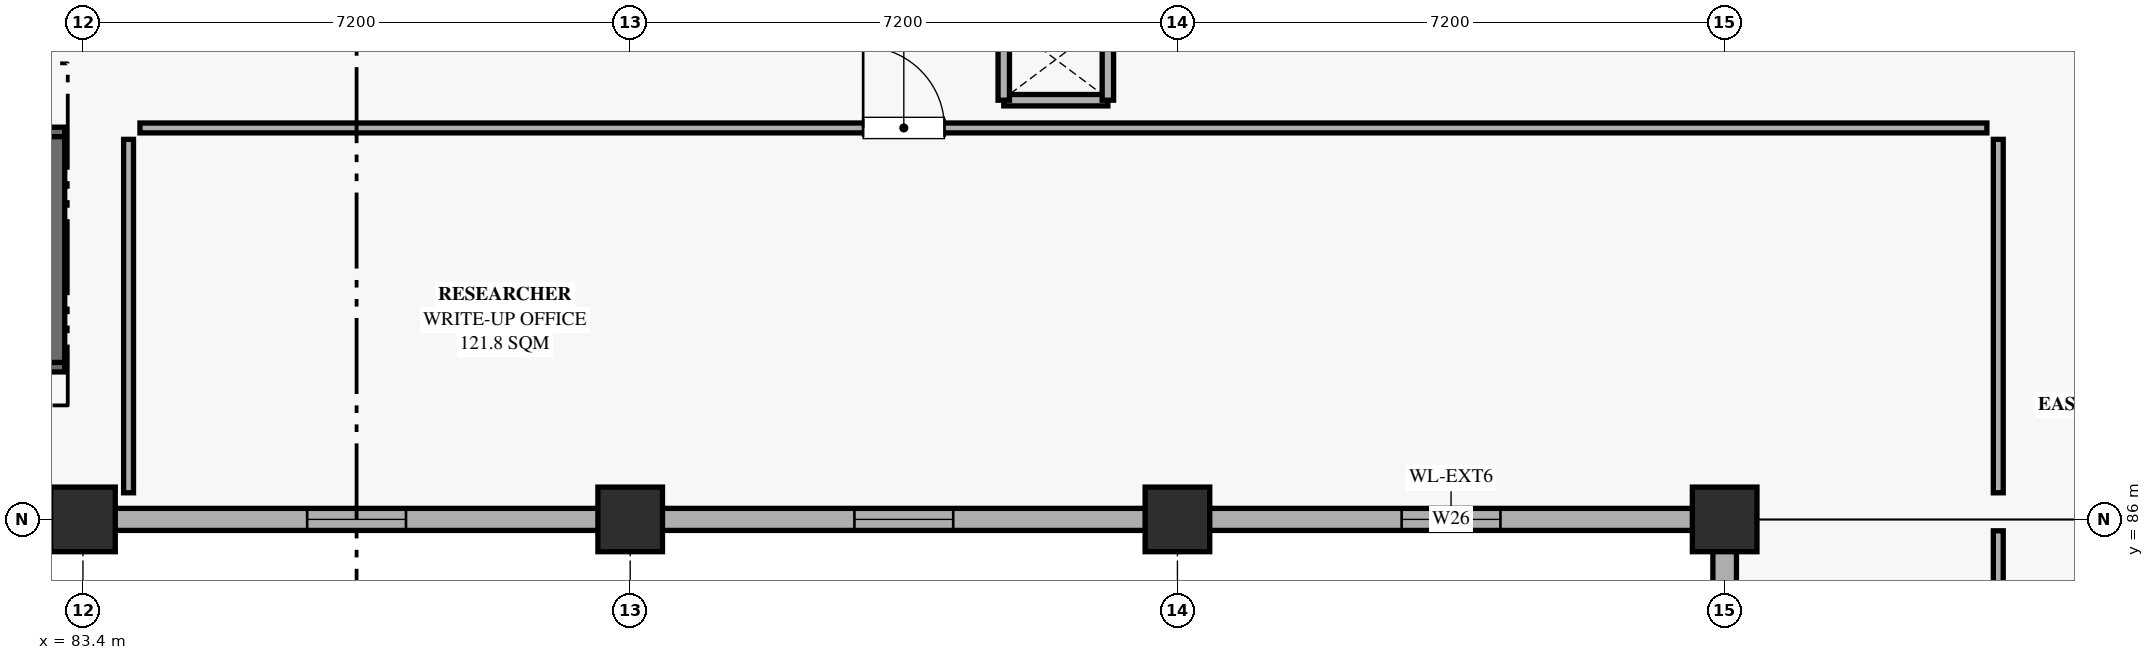
"""IFC4 building model, lengths in metres.
Left out: names, types, materials, properties, quantities, classifications, styles, units other than length and angle.
Written with IfcOpenShell. Run it as: python <this file> out.ifc"""

import sys

from ifc_helpers import new_model, si_unit, direction, frame, frame_2d, origin, origin_2d, place, context, subcontext, project, spatial, rectangle, extrude, element, fill, save


model = new_model("IFC4")
c1 = context("Model", 3, precision=1e-05, world=origin(), true_north=direction((0.0, 1.0)))
c2 = subcontext(c1, "Body", "Model", "MODEL_VIEW")
j1 = project(units=[si_unit("LENGTHUNIT", "METRE"), si_unit("PLANEANGLEUNIT", "RADIAN")], contexts=[c1])
p1 = place(None, origin())
s1 = spatial("IfcSite", under=j1, at=p1, CompositionType="ELEMENT")
p2 = place(p1, origin())
s2 = spatial("IfcBuilding", under=s1, at=p2, CompositionType="ELEMENT")
p3 = place(p2, origin())
s3 = spatial("IfcBuildingStorey", under=s2, at=p3, CompositionType="ELEMENT", Elevation=0.0)
for number, where, z_axis, x_axis in (
    (1, (83.4, 86.0, 0.0), (0.0, 0.0, 1.0), (1.0, 0.0, 0.0)),
    (2, (90.6, 86.0, 0.0), (0.0, 0.0, 1.0), (1.0, 0.0, 0.0)),
    (3, (97.8, 86.0, 0.0), (0.0, 0.0, 1.0), (1.0, 0.0, 0.0)),
    (4, (105.0, 86.0, 0.0), (0.0, 0.0, 1.0), (1.0, 0.0, 0.0)),
):
    element("IfcColumn", number, at=place(p3, frame(where, z_axis=z_axis, x_axis=x_axis)), inside=s3, PredefinedType="COLUMN", context=c2, shape_type="SweptSolid", body=[
        extrude(rectangle(XDim=0.85, YDim=0.85, at=origin_2d()), origin(), (0.0, 0.0, 1.0), 5.4),
    ])
p4 = place(p3, frame((105.0, 79.21, 0.0), z_axis=(0.0, 0.0, 1.0), x_axis=(0.0, 1.0, 0.0)))
e5 = element("IfcWall", 5, at=p4, inside=s3, PredefinedType="SOLIDWALL", context=c2, shape_type="SweptSolid", body=[
    extrude(rectangle(XDim=6.38, YDim=0.31, at=frame_2d((3.19, 0.0))), origin(), (0.0, 0.0, 1.0), 3.9),
])
p5 = place(p4, frame((2.24, 0.0, 0.9)))
e6 = element("IfcOpeningElement", 6, at=p5, cuts=e5, PredefinedType="OPENING", context=c2, shape_type="SweptSolid", body=[
    extrude(rectangle(XDim=1.9, YDim=2.0, at=frame_2d((0.95, 1.0))), frame((0.0, 0.165, 0.0), z_axis=(0.0, -1.0, 0.0), x_axis=(1.0, 0.0, 0.0)), (0.0, 0.0, 1.0), 0.33),
])
p6 = place(p3, frame((104.59, 86.0, 0.0), z_axis=(0.0, 0.0, 1.0), x_axis=(-1.0, 0.0, 0.0)))
e7 = element("IfcWall", 7, at=p6, inside=s3, PredefinedType="SOLIDWALL", context=c2, shape_type="SweptSolid", body=[
    extrude(rectangle(XDim=6.38, YDim=0.29, at=frame_2d((3.19, 0.0))), origin(), (0.0, 0.0, 1.0), 3.9),
])
p7 = place(p6, frame((2.54, 0.0, 0.9)))
e8 = element("IfcOpeningElement", 8, at=p7, cuts=e7, PredefinedType="OPENING", context=c2, shape_type="SweptSolid", body=[
    extrude(rectangle(XDim=1.3, YDim=1.9, at=frame_2d((0.65, 0.95))), frame((0.0, 0.155, 0.0), z_axis=(0.0, -1.0, 0.0), x_axis=(1.0, 0.0, 0.0)), (0.0, 0.0, 1.0), 0.31),
])
p8 = place(p3, frame((97.39, 86.0, 0.0), z_axis=(0.0, 0.0, 1.0), x_axis=(-1.0, 0.0, 0.0)))
e9 = element("IfcWall", 9, at=p8, inside=s3, PredefinedType="SOLIDWALL", context=c2, shape_type="SweptSolid", body=[
    extrude(rectangle(XDim=6.38, YDim=0.29, at=frame_2d((3.19, 0.0))), origin(), (0.0, 0.0, 1.0), 3.9),
])
p9 = place(p8, frame((2.54, 0.0, 0.9)))
e10 = element("IfcOpeningElement", 10, at=p9, cuts=e9, PredefinedType="OPENING", context=c2, shape_type="SweptSolid", body=[
    extrude(rectangle(XDim=1.3, YDim=1.9, at=frame_2d((0.65, 0.95))), frame((0.0, 0.155, 0.0), z_axis=(0.0, -1.0, 0.0), x_axis=(1.0, 0.0, 0.0)), (0.0, 0.0, 1.0), 0.31),
])
p10 = place(p3, frame((90.19, 86.0, 0.0), z_axis=(0.0, 0.0, 1.0), x_axis=(-1.0, 0.0, 0.0)))
e11 = element("IfcWall", 11, at=p10, inside=s3, PredefinedType="SOLIDWALL", context=c2, shape_type="SweptSolid", body=[
    extrude(rectangle(XDim=6.38, YDim=0.29, at=frame_2d((3.19, 0.0))), origin(), (0.0, 0.0, 1.0), 3.9),
])
p11 = place(p10, frame((2.54, 0.0, 0.9)))
e12 = element("IfcOpeningElement", 12, at=p11, cuts=e11, PredefinedType="OPENING", context=c2, shape_type="SweptSolid", body=[
    extrude(rectangle(XDim=1.3, YDim=1.9, at=frame_2d((0.65, 0.95))), frame((0.0, 0.155, 0.0), z_axis=(0.0, -1.0, 0.0), x_axis=(1.0, 0.0, 0.0)), (0.0, 0.0, 1.0), 0.31),
])
p12 = place(p3, frame((96.885, 91.515, 0.0), z_axis=(0.0, 0.0, 1.0), x_axis=(-1.0, 0.0, 0.0)))
e13 = element("IfcWall", 13, at=p12, inside=s3, PredefinedType="PARTITIONING", context=c2, shape_type="SweptSolid", body=[
    extrude(rectangle(XDim=1.37, YDim=0.15, at=frame_2d((0.685, 0.0))), origin(), (0.0, 0.0, 1.0), 3.88),
])
for number, where, z_axis, x_axis in (
    (14, (95.515, 91.515, 0.0), (0.0, 0.0, 1.0), (0.0, 1.0, 0.0)),
    (15, (96.885, 92.585, 0.0), (0.0, 0.0, 1.0), (0.0, -1.0, 0.0)),
):
    element("IfcWall", number, at=place(p3, frame(where, z_axis=z_axis, x_axis=x_axis)), inside=s3, PredefinedType="PARTITIONING", context=c2, shape_type="SweptSolid", body=[
        extrude(rectangle(XDim=1.07, YDim=0.15, at=frame_2d((0.535, 0.0))), origin(), (0.0, 0.0, 1.0), 3.88),
    ])
p13 = place(p3, frame((83.16, 88.065, 0.0), z_axis=(0.0, 0.0, 1.0), x_axis=(-1.0, 0.0, 0.0)))
e16 = element("IfcWall", 16, at=p13, inside=s3, PredefinedType="SHEAR", context=c2, shape_type="SweptSolid", body=[
    extrude(rectangle(XDim=2.62, YDim=0.25, at=frame_2d((1.31, 0.0))), origin(), (0.0, 0.0, 1.0), 5.13),
])
p14 = place(p3, frame((80.54, 91.035, 0.0), z_axis=(0.0, 0.0, 1.0), x_axis=(1.0, 0.0, 0.0)))
e17 = element("IfcWall", 17, at=p14, inside=s3, PredefinedType="SHEAR", context=c2, shape_type="SweptSolid", body=[
    extrude(rectangle(XDim=2.62, YDim=0.25, at=frame_2d((1.31, 0.0))), origin(), (0.0, 0.0, 1.0), 5.13),
])
p15 = place(p14, frame((0.76, 0.0, 0.0)))
e18 = element("IfcOpeningElement", 18, at=p15, cuts=e17, PredefinedType="OPENING", context=c2, shape_type="SweptSolid", body=[
    extrude(rectangle(XDim=1.1, YDim=2.2, at=frame_2d((0.55, 1.1))), frame((0.0, 0.135, 0.0), z_axis=(0.0, -1.0, 0.0), x_axis=(1.0, 0.0, 0.0)), (0.0, 0.0, 1.0), 0.27),
])
p16 = place(p3, frame((83.035, 91.035, 0.0), z_axis=(0.0, 0.0, 1.0), x_axis=(0.0, -1.0, 0.0)))
e19 = element("IfcWall", 19, at=p16, inside=s3, PredefinedType="SHEAR", context=c2, shape_type="SweptSolid", body=[
    extrude(rectangle(XDim=2.97, YDim=0.25, at=frame_2d((1.485, 0.0))), origin(), (0.0, 0.0, 1.0), 5.13),
])
p17 = place(p3, frame((108.6, 85.85, 0.0), z_axis=(0.0, 0.0, 1.0), x_axis=(0.0, -1.0, 0.0)))
e20 = element("IfcWall", 20, at=p17, inside=s3, PredefinedType="PARTITIONING", context=c2, shape_type="SweptSolid", body=[
    extrude(rectangle(XDim=21.3, YDim=0.13, at=frame_2d((10.65, 0.0))), origin(), (0.0, 0.0, 1.0), 3.88),
])
p18 = place(p17, frame((10.135, 0.0, 0.0)))
e21 = element("IfcOpeningElement", 21, at=p18, cuts=e20, PredefinedType="OPENING", context=c2, shape_type="SweptSolid", body=[
    extrude(rectangle(XDim=1.03, YDim=2.1, at=frame_2d((0.515, 1.05))), frame((0.0, 0.075, 0.0), z_axis=(0.0, -1.0, 0.0), x_axis=(1.0, 0.0, 0.0)), (0.0, 0.0, 1.0), 0.15),
])
p19 = place(p3, frame((84.15, 91.15, 0.0), z_axis=(0.0, 0.0, 1.0), x_axis=(1.0, 0.0, 0.0)))
e22 = element("IfcWall", 22, at=p19, inside=s3, PredefinedType="PARTITIONING", context=c2, shape_type="SweptSolid", body=[
    extrude(rectangle(XDim=24.3, YDim=0.13, at=frame_2d((12.15, 0.0))), origin(), (0.0, 0.0, 1.0), 3.88),
])
p20 = place(p19, frame((9.515, 0.0, 0.0)))
e23 = element("IfcOpeningElement", 23, at=p20, cuts=e22, PredefinedType="OPENING", context=c2, shape_type="SweptSolid", body=[
    extrude(rectangle(XDim=1.07, YDim=2.05, at=frame_2d((0.535, 1.025))), frame((0.0, 0.075, 0.0), z_axis=(0.0, -1.0, 0.0), x_axis=(1.0, 0.0, 0.0)), (0.0, 0.0, 1.0), 0.15),
])
for number, where, z_axis, x_axis in (
    (24, (84.0, 86.35, 0.0), (0.0, 0.0, 1.0), (0.0, 1.0, 0.0)),
    (25, (108.6, 91.0, 0.0), (0.0, 0.0, 1.0), (0.0, -1.0, 0.0)),
):
    element("IfcWall", number, at=place(p3, frame(where, z_axis=z_axis, x_axis=x_axis)), inside=s3, PredefinedType="PARTITIONING", context=c2, shape_type="SweptSolid", body=[
        extrude(rectangle(XDim=4.65, YDim=0.13, at=frame_2d((2.325, 0.0))), origin(), (0.0, 0.0, 1.0), 3.88),
    ])
p21 = place(p7, origin())
e26 = element("IfcWindow", 26, at=p21, inside=s3, PartitioningType="SINGLE_PANEL", PredefinedType="WINDOW", context=c2, shape_type="SweptSolid", body=[
    extrude(rectangle(XDim=1.3, YDim=1.9, at=frame_2d((0.65, 0.95))), frame((0.0, 0.03, 0.0), z_axis=(0.0, -1.0, 0.0), x_axis=(1.0, 0.0, 0.0)), (0.0, 0.0, 1.0), 0.06),
])
fill(e8, e26)
p22 = place(p9, origin())
e27 = element("IfcWindow", 27, at=p22, inside=s3, PartitioningType="SINGLE_PANEL", PredefinedType="WINDOW", context=c2, shape_type="SweptSolid", body=[
    extrude(rectangle(XDim=1.3, YDim=1.9, at=frame_2d((0.65, 0.95))), frame((0.0, 0.03, 0.0), z_axis=(0.0, -1.0, 0.0), x_axis=(1.0, 0.0, 0.0)), (0.0, 0.0, 1.0), 0.06),
])
fill(e10, e27)
p23 = place(p11, origin())
e28 = element("IfcWindow", 28, at=p23, inside=s3, PartitioningType="SINGLE_PANEL", PredefinedType="WINDOW", context=c2, shape_type="SweptSolid", body=[
    extrude(rectangle(XDim=1.3, YDim=1.9, at=frame_2d((0.65, 0.95))), frame((0.0, 0.03, 0.0), z_axis=(0.0, -1.0, 0.0), x_axis=(1.0, 0.0, 0.0)), (0.0, 0.0, 1.0), 0.06),
])
fill(e12, e28)
p24 = place(p20, origin())
e29 = element("IfcDoor", 29, at=p24, inside=s3, OperationType="SINGLE_SWING_LEFT", PredefinedType="DOOR", context=c2, shape_type="SweptSolid", body=[
    extrude(rectangle(XDim=1.07, YDim=2.05, at=frame_2d((0.535, 1.025))), frame((0.0, 0.025, 0.0), z_axis=(0.0, -1.0, 0.0), x_axis=(1.0, 0.0, 0.0)), (0.0, 0.0, 1.0), 0.05),
])
fill(e23, e29)
save(model, sys.argv[1])
